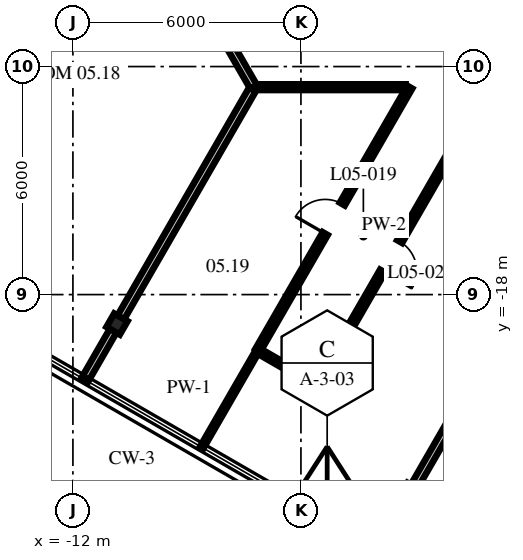
"""IFC4 building model, lengths in metres.
Left out: names, types, materials, properties, quantities, classifications, styles, units other than length and angle.
Written with IfcOpenShell. Run it as: python <this file> out.ifc"""

import sys

from ifc_helpers import new_model, si_unit, direction, frame, frame_2d, origin, origin_2d, place, context, subcontext, project, spatial, rectangle, i_section, extrude, source, transform, mapped, element, fill, save


model = new_model("IFC4")
c1 = context("Model", 3, precision=1e-05, world=origin(), true_north=direction((0.0, 1.0)))
c2 = subcontext(c1, "Body", "Model", "MODEL_VIEW")
j1 = project(units=[si_unit("LENGTHUNIT", "METRE"), si_unit("PLANEANGLEUNIT", "RADIAN")], contexts=[c1])
p1 = place(None, origin())
s1 = spatial("IfcSite", under=j1, at=p1, CompositionType="ELEMENT")
p2 = place(p1, origin())
s2 = spatial("IfcBuilding", under=s1, at=p2, CompositionType="ELEMENT")
p3 = place(p2, frame((0.0, 0.0, 24.6)))
s3 = spatial("IfcBuildingStorey", under=s2, at=p3, CompositionType="ELEMENT", Elevation=24.6)
m1 = source(origin(), c2, "Body", "SweptSolid", [
    extrude(i_section(OverallWidth=0.404, OverallDepth=0.406, WebThickness=0.027, FlangeThickness=0.044, at=origin_2d()), origin(), (0.0, 0.0, 1.0), 4.3),
])
p4 = place(p3, frame((-10.84, -18.775, 0.0), z_axis=(0.0, 0.0, 1.0), x_axis=(0.866025403784, -0.5, 0.0)))
e1 = element("IfcColumn", 1, at=p4, inside=s3, PredefinedType="COLUMN", context=c2, shape_type="MappedRepresentation", body=[
    mapped(m1, transform((0.0, 0.0, 0.0), scale=1.0)),
])
m2 = source(origin(), c2, "Body", "SweptSolid", [
    extrude(rectangle(XDim=8.229, YDim=0.2, at=frame_2d((4.115, 0.0))), origin(), (0.0, 0.0, 1.0), 4.1),
])
p5 = place(p3, frame((-11.356, -5.416, 0.0), z_axis=(0.0, 0.0, 1.0), x_axis=(0.500012644715, -0.866018103232, 0.0)))
e2 = element("IfcWall", 2, at=p5, inside=s3, PredefinedType="PARTITIONING", context=c2, shape_type="MappedRepresentation", body=[
    mapped(m2, transform((0.0, 0.0, 0.0), scale=1.0)),
])
m3 = source(origin(), c2, "Body", "SweptSolid", [
    extrude(rectangle(XDim=1.69, YDim=0.15, at=frame_2d((0.845, 0.0))), origin(), (0.0, 0.0, 1.0), 4.1),
])
p6 = place(p3, frame((-7.084, -19.5, 0.0), z_axis=(0.0, 0.0, 1.0), x_axis=(0.866002725405, -0.500039278049, 0.0)))
e3 = element("IfcWall", 3, at=p6, inside=s3, PredefinedType="PARTITIONING", context=c2, shape_type="MappedRepresentation", body=[
    mapped(m3, transform((0.0, 0.0, 0.0), scale=1.0)),
])
m4 = source(origin(), c2, "Body", "SweptSolid", [
    extrude(rectangle(XDim=3.925, YDim=0.15, at=frame_2d((1.962, 0.0))), origin(), (0.0, 0.0, 1.0), 4.1),
])
p7 = place(p3, frame((-7.171, -12.542, 0.0), z_axis=(0.0, 0.0, 1.0), x_axis=(1.0, 0.0, 0.0)))
e4 = element("IfcWall", 4, at=p7, inside=s3, PredefinedType="PARTITIONING", context=c2, shape_type="MappedRepresentation", body=[
    mapped(m4, transform((0.0, 0.0, 0.0), scale=1.0)),
])
m5 = source(origin(), c2, "Body", "SweptSolid", [
    extrude(rectangle(XDim=12.148, YDim=0.2, at=frame_2d((6.074, 0.0))), origin(), (0.0, 0.0, 1.0), 3.343),
])
p8 = place(p3, frame((-3.027, -23.063, 0.0), z_axis=(0.0, 0.0, 1.0), x_axis=(0.499997320042, 0.866026951053, 0.0)))
e5 = element("IfcWall", 5, at=p8, inside=s3, PredefinedType="PARTITIONING", context=c2, shape_type="MappedRepresentation", body=[
    mapped(m5, transform((0.0, 0.0, 0.0), scale=1.0)),
])
m6 = source(origin(), c2, "Body", "SweptSolid", [
    extrude(rectangle(XDim=9.039, YDim=0.15, at=frame_2d((4.519, 0.0))), origin(), (0.0, 0.0, 1.0), 4.1),
])
p9 = place(p3, frame((-5.577, -20.37, 0.0), z_axis=(0.0, 0.0, 1.0), x_axis=(0.499999912267, 0.866025454437, 0.0)))
e6 = element("IfcWall", 6, at=p9, inside=s3, PredefinedType="PARTITIONING", context=c2, shape_type="MappedRepresentation", body=[
    mapped(m6, transform((0.0, 0.0, 0.0), scale=1.0)),
])
p10 = place(p9, frame((3.449, 0.0, 0.0)))
e7 = element("IfcOpeningElement", 7, at=p10, cuts=e6, PredefinedType="OPENING", context=c2, shape_type="SweptSolid", body=[
    extrude(rectangle(XDim=0.9, YDim=2.1, at=frame_2d((0.45, 1.05))), frame((0.0, 0.085, 0.0), z_axis=(0.0, -1.0, 0.0), x_axis=(1.0, 0.0, 0.0)), (0.0, 0.0, 1.0), 0.17),
])
m7 = source(origin(), c2, "Body", "SweptSolid", [
    extrude(rectangle(XDim=2.941, YDim=0.1, at=frame_2d((1.47, 0.0))), origin(), (0.0, 0.0, 1.0), 4.1),
])
p11 = place(p3, frame((-8.607, -22.018, 0.0), z_axis=(0.0, 0.0, 1.0), x_axis=(0.500005104963, 0.866022456413, 0.0)))
e8 = element("IfcWall", 8, at=p11, inside=s3, PredefinedType="PARTITIONING", context=c2, shape_type="MappedRepresentation", body=[
    mapped(m7, transform((0.0, 0.0, 0.0), scale=1.0)),
])
m8 = source(origin(), c2, "Body", "SweptSolid", [
    extrude(rectangle(XDim=8.0, YDim=0.15, at=frame_2d((4.0, 0.0))), origin(), (0.0, 0.0, 1.0), 4.1),
])
p12 = place(p3, frame((-7.136, -19.47, 0.0), z_axis=(0.0, 0.0, 1.0), x_axis=(0.500002489515, 0.866023966458, 0.0)))
e9 = element("IfcWall", 9, at=p12, inside=s3, PredefinedType="PARTITIONING", context=c2, shape_type="MappedRepresentation", body=[
    mapped(m8, transform((0.0, 0.0, 0.0), scale=1.0)),
])
p13 = place(p12, frame((3.549, 0.0, 0.0)))
e10 = element("IfcOpeningElement", 10, at=p13, cuts=e9, PredefinedType="OPENING", context=c2, shape_type="SweptSolid", body=[
    extrude(rectangle(XDim=0.9, YDim=2.1, at=frame_2d((0.45, 1.05))), frame((0.0, 0.085, 0.0), z_axis=(0.0, -1.0, 0.0), x_axis=(1.0, 0.0, 0.0)), (0.0, 0.0, 1.0), 0.17),
])
m9 = source(origin(), c2, "Body", "SweptSolid", [
    extrude(rectangle(XDim=1.499, YDim=0.2, at=frame_2d((0.749, 0.0))), origin(), (0.0, 0.0, 1.0), 4.1),
])
p14 = place(p3, frame((-11.686, -20.24, 0.0), z_axis=(0.0, 0.0, 1.0), x_axis=(0.499976292358, 0.866039090965, 0.0)))
e11 = element("IfcWall", 11, at=p14, inside=s3, PredefinedType="PARTITIONING", context=c2, shape_type="MappedRepresentation", body=[
    mapped(m9, transform((0.0, 0.0, 0.0), scale=1.0)),
])
m10 = source(origin(), c2, "Body", "SweptSolid", [
    extrude(rectangle(XDim=6.934, YDim=0.2, at=frame_2d((3.467, 0.0))), origin(), (0.0, 0.0, 1.0), 3.488),
])
p15 = place(p3, frame((-10.743, -18.608, 0.0), z_axis=(0.0, 0.0, 1.0), x_axis=(0.499986605379, 0.866033137035, 0.0)))
e12 = element("IfcWall", 12, at=p15, inside=s3, PredefinedType="PARTITIONING", context=c2, shape_type="MappedRepresentation", body=[
    mapped(m10, transform((0.0, 0.0, 0.0), scale=1.0)),
])
p16 = place(p13, origin())
e13 = element("IfcDoor", 13, at=p16, inside=s3, OperationType="SINGLE_SWING_LEFT", PredefinedType="DOOR", context=c2, shape_type="SweptSolid", body=[
    extrude(rectangle(XDim=0.9, YDim=2.1, at=frame_2d((0.45, 1.05))), frame((0.0, 0.025, 0.0), z_axis=(0.0, -1.0, 0.0), x_axis=(1.0, 0.0, 0.0)), (0.0, 0.0, 1.0), 0.05),
])
fill(e10, e13)
p17 = place(p10, origin())
e14 = element("IfcDoor", 14, at=p17, inside=s3, OperationType="SINGLE_SWING_RIGHT", PredefinedType="DOOR", context=c2, shape_type="SweptSolid", body=[
    extrude(rectangle(XDim=0.9, YDim=2.1, at=frame_2d((0.45, 1.05))), frame((0.0, 0.025, 0.0), z_axis=(0.0, -1.0, 0.0), x_axis=(1.0, 0.0, 0.0)), (0.0, 0.0, 1.0), 0.05),
])
fill(e7, e14)
save(model, sys.argv[1])
